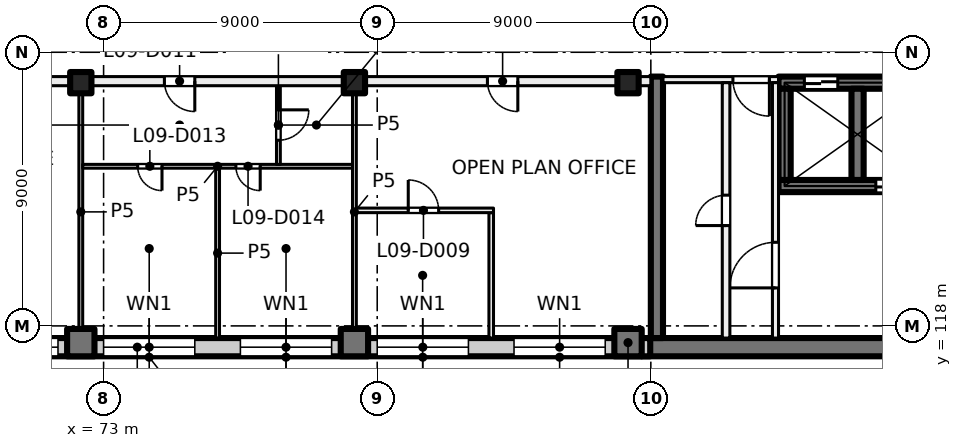
"""IFC4 building model, lengths in metres.
Left out: names, types, materials, properties, quantities, classifications, styles, units other than length and angle.
Written with IfcOpenShell. Run it as: python <this file> out.ifc"""

import sys

from ifc_helpers import new_model, si_unit, direction, frame, frame_2d, origin, origin_2d, place, context, subcontext, project, spatial, rectangle, extrude, element, fill, save


model = new_model("IFC4")
c1 = context("Model", 3, precision=1e-05, world=origin(), true_north=direction((0.0, 1.0)))
c2 = subcontext(c1, "Body", "Model", "MODEL_VIEW")
j1 = project(units=[si_unit("LENGTHUNIT", "METRE"), si_unit("PLANEANGLEUNIT", "RADIAN")], contexts=[c1])
p1 = place(None, origin())
s1 = spatial("IfcSite", under=j1, at=p1, CompositionType="ELEMENT")
p2 = place(p1, origin())
s2 = spatial("IfcBuilding", under=s1, at=p2, CompositionType="ELEMENT")
p3 = place(p2, frame((0.0, 0.0, 43.5)))
s3 = spatial("IfcBuildingStorey", under=s2, at=p3, CompositionType="ELEMENT", Elevation=43.5)
for number, where, z_axis, x_axis in (
    (1, (72.25, 126.0, 0.0), (0.0, 0.0, 1.0), (1.0, 0.0, 0.0)),
    (2, (81.25, 126.0, 0.0), (0.0, 0.0, 1.0), (1.0, 0.0, 0.0)),
    (3, (90.25, 126.0, 0.0), (0.0, 0.0, 1.0), (1.0, 0.0, 0.0)),
):
    element("IfcColumn", number, at=place(p3, frame(where, z_axis=z_axis, x_axis=x_axis)), inside=s3, PredefinedType="COLUMN", context=c2, shape_type="SweptSolid", body=[
        extrude(rectangle(XDim=0.7, YDim=0.7, at=origin_2d()), origin(), (0.0, 0.0, 1.0), 4.0),
    ])
for number, where, z_axis, x_axis in (
    (4, (72.25, 117.45, 0.0), (0.0, 0.0, 1.0), (1.0, 0.0, 0.0)),
    (5, (81.25, 117.45, 0.0), (0.0, 0.0, 1.0), (1.0, 0.0, 0.0)),
    (6, (90.25, 117.45, 0.0), (0.0, 0.0, 1.0), (1.0, 0.0, 0.0)),
):
    element("IfcColumn", number, at=place(p3, frame(where, z_axis=z_axis, x_axis=x_axis)), inside=s3, PredefinedType="COLUMN", context=c2, shape_type="SweptSolid", body=[
        extrude(rectangle(XDim=0.9, YDim=0.9, at=origin_2d()), origin(), (0.0, 0.0, 1.0), 4.0),
    ])
p4 = place(p3, frame((99.6, 117.3, 0.0), z_axis=(0.0, 0.0, 1.0), x_axis=(-1.0, 0.0, 0.0)))
e7 = element("IfcWall", 7, at=p4, inside=s3, PredefinedType="SHEAR", context=c2, shape_type="SweptSolid", body=[
    extrude(rectangle(XDim=8.9, YDim=0.6, at=frame_2d((4.45, 0.0))), origin(), (0.0, 0.0, 1.0), 4.0),
])
p5 = place(p3, frame((107.4, 126.0, 0.0), z_axis=(0.0, 0.0, 1.0), x_axis=(-1.0, 0.0, 0.0)))
e8 = element("IfcWall", 8, at=p5, inside=s3, PredefinedType="SHEAR", context=c2, shape_type="SweptSolid", body=[
    extrude(rectangle(XDim=12.2, YDim=0.4, at=frame_2d((6.1, 0.0))), origin(), (0.0, 0.0, 1.0), 4.0),
])
p6 = place(p5, frame((10.25, 0.0, 0.0)))
e9 = element("IfcOpeningElement", 9, at=p6, cuts=e8, PredefinedType="OPENING", context=c2, shape_type="SweptSolid", body=[
    extrude(rectangle(XDim=1.1, YDim=2.1, at=frame_2d((0.55, 1.05))), frame((0.0, 0.21, 0.0), z_axis=(0.0, -1.0, 0.0), x_axis=(1.0, 0.0, 0.0)), (0.0, 0.0, 1.0), 0.42),
])
p7 = place(p5, frame((0.7, 0.0, 0.0)))
e10 = element("IfcOpeningElement", 10, at=p7, cuts=e8, PredefinedType="OPENING", context=c2, shape_type="SweptSolid", body=[
    extrude(rectangle(XDim=0.8, YDim=2.1, at=frame_2d((0.4, 1.05))), frame((0.0, 0.21, 0.0), z_axis=(0.0, -1.0, 0.0), x_axis=(1.0, 0.0, 0.0)), (0.0, 0.0, 1.0), 0.42),
])
p8 = place(p3, frame((107.4, 122.6, 0.0), z_axis=(0.0, 0.0, 1.0), x_axis=(-1.0, 0.0, 0.0)))
e11 = element("IfcWall", 11, at=p8, inside=s3, PredefinedType="SHEAR", context=c2, shape_type="SweptSolid", body=[
    extrude(rectangle(XDim=12.2, YDim=0.4, at=frame_2d((6.1, 0.0))), origin(), (0.0, 0.0, 1.0), 4.0),
])
p9 = place(p8, frame((7.9, 0.0, 0.0)))
e12 = element("IfcOpeningElement", 12, at=p9, cuts=e11, PredefinedType="OPENING", context=c2, shape_type="SweptSolid", body=[
    extrude(rectangle(XDim=1.1, YDim=2.1, at=frame_2d((0.55, 1.05))), frame((0.0, 0.21, 0.0), z_axis=(0.0, -1.0, 0.0), x_axis=(1.0, 0.0, 0.0)), (0.0, 0.0, 1.0), 0.42),
])
for number, where, z_axis, x_axis in (
    (13, (97.8, 125.8, 0.0), (0.0, 0.0, 1.0), (0.0, -1.0, 0.0)),
    (14, (95.4, 125.8, 0.0), (0.0, 0.0, 1.0), (0.0, -1.0, 0.0)),
):
    element("IfcWall", number, at=place(p3, frame(where, z_axis=z_axis, x_axis=x_axis)), inside=s3, PredefinedType="SHEAR", context=c2, shape_type="SweptSolid", body=[
        extrude(rectangle(XDim=3.0, YDim=0.4, at=frame_2d((1.5, 0.0))), origin(), (0.0, 0.0, 1.0), 4.0),
    ])
p10 = place(p3, frame((91.2, 126.2, 0.0), z_axis=(0.0, 0.0, 1.0), x_axis=(0.0, -1.0, 0.0)))
e15 = element("IfcWall", 15, at=p10, inside=s3, PredefinedType="SHEAR", context=c2, shape_type="SweptSolid", body=[
    extrude(rectangle(XDim=8.6, YDim=0.4, at=frame_2d((4.3, 0.0))), origin(), (0.0, 0.0, 1.0), 4.0),
])
p11 = place(p3, frame((90.98, 117.3, 0.0), z_axis=(0.0, 0.0, 1.0), x_axis=(-1.0, 0.0, 0.0)))
e16 = element("IfcWall", 16, at=p11, inside=s3, PredefinedType="SOLIDWALL", context=c2, shape_type="SweptSolid", body=[
    extrude(rectangle(XDim=33.745, YDim=0.6, at=frame_2d((16.873, 0.0))), origin(), (0.0, 0.0, 1.0), 3.625),
])
p12 = place(p11, frame((1.48, 0.0, 0.9)))
e17 = element("IfcOpeningElement", 17, at=p12, cuts=e16, PredefinedType="OPENING", context=c2, shape_type="SweptSolid", body=[
    extrude(rectangle(XDim=3.0, YDim=2.4, at=frame_2d((1.5, 1.2))), frame((0.0, 0.31, 0.0), z_axis=(0.0, -1.0, 0.0), x_axis=(1.0, 0.0, 0.0)), (0.0, 0.0, 1.0), 0.62),
])
p13 = place(p11, frame((5.98, 0.0, 0.9)))
e18 = element("IfcOpeningElement", 18, at=p13, cuts=e16, PredefinedType="OPENING", context=c2, shape_type="SweptSolid", body=[
    extrude(rectangle(XDim=3.0, YDim=2.4, at=frame_2d((1.5, 1.2))), frame((0.0, 0.31, 0.0), z_axis=(0.0, -1.0, 0.0), x_axis=(1.0, 0.0, 0.0)), (0.0, 0.0, 1.0), 0.62),
])
p14 = place(p11, frame((10.48, 0.0, 0.9)))
e19 = element("IfcOpeningElement", 19, at=p14, cuts=e16, PredefinedType="OPENING", context=c2, shape_type="SweptSolid", body=[
    extrude(rectangle(XDim=3.0, YDim=2.4, at=frame_2d((1.5, 1.2))), frame((0.0, 0.31, 0.0), z_axis=(0.0, -1.0, 0.0), x_axis=(1.0, 0.0, 0.0)), (0.0, 0.0, 1.0), 0.62),
])
p15 = place(p11, frame((14.98, 0.0, 0.9)))
e20 = element("IfcOpeningElement", 20, at=p15, cuts=e16, PredefinedType="OPENING", context=c2, shape_type="SweptSolid", body=[
    extrude(rectangle(XDim=3.0, YDim=2.4, at=frame_2d((1.5, 1.2))), frame((0.0, 0.31, 0.0), z_axis=(0.0, -1.0, 0.0), x_axis=(1.0, 0.0, 0.0)), (0.0, 0.0, 1.0), 0.62),
])
p16 = place(p11, frame((19.48, 0.0, 0.9)))
e21 = element("IfcOpeningElement", 21, at=p16, cuts=e16, PredefinedType="OPENING", context=c2, shape_type="SweptSolid", body=[
    extrude(rectangle(XDim=3.0, YDim=2.4, at=frame_2d((1.5, 1.2))), frame((0.0, 0.31, 0.0), z_axis=(0.0, -1.0, 0.0), x_axis=(1.0, 0.0, 0.0)), (0.0, 0.0, 1.0), 0.62),
])
p17 = place(p11, frame((24.58, 0.0, 0.0)))
e22 = element("IfcOpeningElement", 22, at=p17, cuts=e16, PredefinedType="OPENING", context=c2, shape_type="SweptSolid", body=[
    extrude(rectangle(XDim=1.8, YDim=2.4, at=frame_2d((0.9, 1.2))), frame((0.0, 0.31, 0.0), z_axis=(0.0, -1.0, 0.0), x_axis=(1.0, 0.0, 0.0)), (0.0, 0.0, 1.0), 0.62),
])
p18 = place(p11, frame((28.48, 0.0, 0.9)))
e23 = element("IfcOpeningElement", 23, at=p18, cuts=e16, PredefinedType="OPENING", context=c2, shape_type="SweptSolid", body=[
    extrude(rectangle(XDim=3.0, YDim=2.4, at=frame_2d((1.5, 1.2))), frame((0.0, 0.31, 0.0), z_axis=(0.0, -1.0, 0.0), x_axis=(1.0, 0.0, 0.0)), (0.0, 0.0, 1.0), 0.62),
])
p19 = place(p3, frame((95.2, 126.1, 0.0), z_axis=(0.0, 0.0, 1.0), x_axis=(-1.0, 0.0, 0.0)))
e24 = element("IfcWall", 24, at=p19, inside=s3, PredefinedType="PARTITIONING", context=c2, shape_type="SweptSolid", body=[
    extrude(rectangle(XDim=3.8, YDim=0.2, at=frame_2d((1.9, 0.0))), origin(), (0.0, 0.0, 1.0), 3.625),
])
p20 = place(p19, frame((0.3, 0.0, 0.0)))
e25 = element("IfcOpeningElement", 25, at=p20, cuts=e24, PredefinedType="OPENING", context=c2, shape_type="SweptSolid", body=[
    extrude(rectangle(XDim=1.2, YDim=2.1, at=frame_2d((0.6, 1.05))), frame((0.0, 0.11, 0.0), z_axis=(0.0, -1.0, 0.0), x_axis=(1.0, 0.0, 0.0)), (0.0, 0.0, 1.0), 0.22),
])
p21 = place(p3, frame((95.1, 117.6, 0.0), z_axis=(0.0, 0.0, 1.0), x_axis=(0.0, 1.0, 0.0)))
e26 = element("IfcWall", 26, at=p21, inside=s3, PredefinedType="PARTITIONING", context=c2, shape_type="SweptSolid", body=[
    extrude(rectangle(XDim=8.4, YDim=0.2, at=frame_2d((4.2, 0.0))), origin(), (0.0, 0.0, 1.0), 3.625),
])
p22 = place(p21, frame((1.65, 0.0, 0.0)))
e27 = element("IfcOpeningElement", 27, at=p22, cuts=e26, PredefinedType="OPENING", context=c2, shape_type="SweptSolid", body=[
    extrude(rectangle(XDim=1.5, YDim=2.1, at=frame_2d((0.75, 1.05))), frame((0.0, 0.11, 0.0), z_axis=(0.0, -1.0, 0.0), x_axis=(1.0, 0.0, 0.0)), (0.0, 0.0, 1.0), 0.22),
])
p23 = place(p3, frame((93.475, 117.6, 0.0), z_axis=(0.0, 0.0, 1.0), x_axis=(0.0, 1.0, 0.0)))
e28 = element("IfcWall", 28, at=p23, inside=s3, PredefinedType="PARTITIONING", context=c2, shape_type="SweptSolid", body=[
    extrude(rectangle(XDim=8.4, YDim=0.25, at=frame_2d((4.2, 0.0))), origin(), (0.0, 0.0, 1.0), 3.625),
])
p24 = place(p23, frame((3.7, 0.0, 0.0)))
e29 = element("IfcOpeningElement", 29, at=p24, cuts=e28, PredefinedType="OPENING", context=c2, shape_type="SweptSolid", body=[
    extrude(rectangle(XDim=1.0, YDim=2.1, at=frame_2d((0.5, 1.05))), frame((0.0, 0.135, 0.0), z_axis=(0.0, -1.0, 0.0), x_axis=(1.0, 0.0, 0.0)), (0.0, 0.0, 1.0), 0.27),
])
p25 = place(p3, frame((72.25, 117.6, 0.0), z_axis=(0.0, 0.0, 1.0), x_axis=(0.0, 1.0, 0.0)))
e30 = element("IfcWall", 30, at=p25, inside=s3, PredefinedType="PARTITIONING", context=c2, shape_type="SweptSolid", body=[
    extrude(rectangle(XDim=8.3, YDim=0.125, at=frame_2d((4.15, 0.0))), origin(), (0.0, 0.0, 1.0), 3.625),
])
p26 = place(p3, frame((81.188, 123.25, 0.0), z_axis=(0.0, 0.0, 1.0), x_axis=(-1.0, 0.0, 0.0)))
e31 = element("IfcWall", 31, at=p26, inside=s3, PredefinedType="PARTITIONING", context=c2, shape_type="SweptSolid", body=[
    extrude(rectangle(XDim=8.876, YDim=0.125, at=frame_2d((4.438, 0.0))), origin(), (0.0, 0.0, 1.0), 3.625),
])
p27 = place(p26, frame((6.267, 0.0, 0.0)))
e32 = element("IfcOpeningElement", 32, at=p27, cuts=e31, PredefinedType="OPENING", context=c2, shape_type="SweptSolid", body=[
    extrude(rectangle(XDim=0.8, YDim=2.1, at=frame_2d((0.4, 1.05))), frame((0.0, 0.073, 0.0), z_axis=(0.0, -1.0, 0.0), x_axis=(1.0, 0.0, 0.0)), (0.0, 0.0, 1.0), 0.145),
])
p28 = place(p26, frame((3.037, 0.0, 0.0)))
e33 = element("IfcOpeningElement", 33, at=p28, cuts=e31, PredefinedType="OPENING", context=c2, shape_type="SweptSolid", body=[
    extrude(rectangle(XDim=0.8, YDim=2.1, at=frame_2d((0.4, 1.05))), frame((0.0, 0.073, 0.0), z_axis=(0.0, -1.0, 0.0), x_axis=(1.0, 0.0, 0.0)), (0.0, 0.0, 1.0), 0.145),
])
p29 = place(p3, frame((76.75, 117.6, 0.0), z_axis=(0.0, 0.0, 1.0), x_axis=(0.0, 1.0, 0.0)))
e34 = element("IfcWall", 34, at=p29, inside=s3, PredefinedType="PARTITIONING", context=c2, shape_type="SweptSolid", body=[
    extrude(rectangle(XDim=5.588, YDim=0.125, at=frame_2d((2.794, 0.0))), origin(), (0.0, 0.0, 1.0), 3.625),
])
p30 = place(p3, frame((78.75, 125.9, 0.0), z_axis=(0.0, 0.0, 1.0), x_axis=(0.0, -1.0, 0.0)))
e35 = element("IfcWall", 35, at=p30, inside=s3, PredefinedType="PARTITIONING", context=c2, shape_type="SweptSolid", body=[
    extrude(rectangle(XDim=2.588, YDim=0.125, at=frame_2d((1.294, 0.0))), origin(), (0.0, 0.0, 1.0), 3.625),
])
p31 = place(p30, frame((0.794, 0.0, 0.0)))
e36 = element("IfcOpeningElement", 36, at=p31, cuts=e35, PredefinedType="OPENING", context=c2, shape_type="SweptSolid", body=[
    extrude(rectangle(XDim=1.0, YDim=2.1, at=frame_2d((0.5, 1.05))), frame((0.0, 0.073, 0.0), z_axis=(0.0, -1.0, 0.0), x_axis=(1.0, 0.0, 0.0)), (0.0, 0.0, 1.0), 0.145),
])
p32 = place(p3, frame((81.25, 117.6, 0.0), z_axis=(0.0, 0.0, 1.0), x_axis=(0.0, 1.0, 0.0)))
e37 = element("IfcWall", 37, at=p32, inside=s3, PredefinedType="PARTITIONING", context=c2, shape_type="SweptSolid", body=[
    extrude(rectangle(XDim=8.3, YDim=0.125, at=frame_2d((4.15, 0.0))), origin(), (0.0, 0.0, 1.0), 3.625),
])
p33 = place(p3, frame((85.75, 117.6, 0.0), z_axis=(0.0, 0.0, 1.0), x_axis=(0.0, 1.0, 0.0)))
e38 = element("IfcWall", 38, at=p33, inside=s3, PredefinedType="PARTITIONING", context=c2, shape_type="SweptSolid", body=[
    extrude(rectangle(XDim=4.125, YDim=0.15, at=frame_2d((2.062, 0.0))), origin(), (0.0, 0.0, 1.0), 3.625),
])
p34 = place(p3, frame((81.312, 121.8, 0.0), z_axis=(0.0, 0.0, 1.0), x_axis=(1.0, 0.0, 0.0)))
e39 = element("IfcWall", 39, at=p34, inside=s3, PredefinedType="PARTITIONING", context=c2, shape_type="SweptSolid", body=[
    extrude(rectangle(XDim=4.513, YDim=0.15, at=frame_2d((2.256, 0.0))), origin(), (0.0, 0.0, 1.0), 3.625),
])
p35 = place(p34, frame((1.709, 0.0, 0.0)))
e40 = element("IfcOpeningElement", 40, at=p35, cuts=e39, PredefinedType="OPENING", context=c2, shape_type="SweptSolid", body=[
    extrude(rectangle(XDim=1.0, YDim=2.1, at=frame_2d((0.5, 1.05))), frame((0.0, 0.085, 0.0), z_axis=(0.0, -1.0, 0.0), x_axis=(1.0, 0.0, 0.0)), (0.0, 0.0, 1.0), 0.17),
])
p36 = place(p3, frame((91.0, 126.05, 0.0), z_axis=(0.0, 0.0, 1.0), x_axis=(-1.0, 0.0, 0.0)))
e41 = element("IfcWall", 41, at=p36, inside=s3, PredefinedType="PARTITIONING", context=c2, shape_type="SweptSolid", body=[
    extrude(rectangle(XDim=43.785, YDim=0.3, at=frame_2d((21.893, 0.0))), origin(), (0.0, 0.0, 1.0), 3.625),
])
p37 = place(p36, frame((4.375, 0.0, 0.0)))
e42 = element("IfcOpeningElement", 42, at=p37, cuts=e41, PredefinedType="OPENING", context=c2, shape_type="SweptSolid", body=[
    extrude(rectangle(XDim=1.0, YDim=2.1, at=frame_2d((0.5, 1.05))), frame((0.0, 0.16, 0.0), z_axis=(0.0, -1.0, 0.0), x_axis=(1.0, 0.0, 0.0)), (0.0, 0.0, 1.0), 0.32),
])
p38 = place(p36, frame((15.0, 0.0, 0.0)))
e43 = element("IfcOpeningElement", 43, at=p38, cuts=e41, PredefinedType="OPENING", context=c2, shape_type="SweptSolid", body=[
    extrude(rectangle(XDim=1.0, YDim=2.1, at=frame_2d((0.5, 1.05))), frame((0.0, 0.16, 0.0), z_axis=(0.0, -1.0, 0.0), x_axis=(1.0, 0.0, 0.0)), (0.0, 0.0, 1.0), 0.32),
])
p39 = place(p36, frame((34.0, 0.0, 0.0)))
e44 = element("IfcOpeningElement", 44, at=p39, cuts=e41, PredefinedType="OPENING", context=c2, shape_type="SweptSolid", body=[
    extrude(rectangle(XDim=1.0, YDim=2.1, at=frame_2d((0.5, 1.05))), frame((0.0, 0.16, 0.0), z_axis=(0.0, -1.0, 0.0), x_axis=(1.0, 0.0, 0.0)), (0.0, 0.0, 1.0), 0.32),
])
p40 = place(p36, frame((39.296, 0.0, 0.0)))
e45 = element("IfcOpeningElement", 45, at=p40, cuts=e41, PredefinedType="OPENING", context=c2, shape_type="SweptSolid", body=[
    extrude(rectangle(XDim=1.8, YDim=2.1, at=frame_2d((0.9, 1.05))), frame((0.0, 0.16, 0.0), z_axis=(0.0, -1.0, 0.0), x_axis=(1.0, 0.0, 0.0)), (0.0, 0.0, 1.0), 0.32),
])
p41 = place(p12, origin())
e46 = element("IfcWindow", 46, at=p41, inside=s3, PartitioningType="SINGLE_PANEL", PredefinedType="WINDOW", context=c2, shape_type="SweptSolid", body=[
    extrude(rectangle(XDim=3.0, YDim=2.4, at=frame_2d((1.5, 1.2))), frame((0.0, 0.03, 0.0), z_axis=(0.0, -1.0, 0.0), x_axis=(1.0, 0.0, 0.0)), (0.0, 0.0, 1.0), 0.06),
])
fill(e17, e46)
p42 = place(p13, origin())
e47 = element("IfcWindow", 47, at=p42, inside=s3, PartitioningType="SINGLE_PANEL", PredefinedType="WINDOW", context=c2, shape_type="SweptSolid", body=[
    extrude(rectangle(XDim=3.0, YDim=2.4, at=frame_2d((1.5, 1.2))), frame((0.0, 0.03, 0.0), z_axis=(0.0, -1.0, 0.0), x_axis=(1.0, 0.0, 0.0)), (0.0, 0.0, 1.0), 0.06),
])
fill(e18, e47)
p43 = place(p14, origin())
e48 = element("IfcWindow", 48, at=p43, inside=s3, PartitioningType="SINGLE_PANEL", PredefinedType="WINDOW", context=c2, shape_type="SweptSolid", body=[
    extrude(rectangle(XDim=3.0, YDim=2.4, at=frame_2d((1.5, 1.2))), frame((0.0, 0.03, 0.0), z_axis=(0.0, -1.0, 0.0), x_axis=(1.0, 0.0, 0.0)), (0.0, 0.0, 1.0), 0.06),
])
fill(e19, e48)
p44 = place(p15, origin())
e49 = element("IfcWindow", 49, at=p44, inside=s3, PartitioningType="SINGLE_PANEL", PredefinedType="WINDOW", context=c2, shape_type="SweptSolid", body=[
    extrude(rectangle(XDim=3.0, YDim=2.4, at=frame_2d((1.5, 1.2))), frame((0.0, 0.03, 0.0), z_axis=(0.0, -1.0, 0.0), x_axis=(1.0, 0.0, 0.0)), (0.0, 0.0, 1.0), 0.06),
])
fill(e20, e49)
p45 = place(p16, origin())
e50 = element("IfcWindow", 50, at=p45, inside=s3, PartitioningType="SINGLE_PANEL", PredefinedType="WINDOW", context=c2, shape_type="SweptSolid", body=[
    extrude(rectangle(XDim=3.0, YDim=2.4, at=frame_2d((1.5, 1.2))), frame((0.0, 0.03, 0.0), z_axis=(0.0, -1.0, 0.0), x_axis=(1.0, 0.0, 0.0)), (0.0, 0.0, 1.0), 0.06),
])
fill(e21, e50)
p46 = place(p6, origin())
e51 = element("IfcDoor", 51, at=p46, inside=s3, OperationType="DOUBLE_DOOR_SLIDING", PredefinedType="DOOR", context=c2, shape_type="SweptSolid", body=[
    extrude(rectangle(XDim=1.1, YDim=2.1, at=frame_2d((0.55, 1.05))), frame((0.0, 0.025, 0.0), z_axis=(0.0, -1.0, 0.0), x_axis=(1.0, 0.0, 0.0)), (0.0, 0.0, 1.0), 0.05),
])
fill(e9, e51)
p47 = place(p20, origin())
e52 = element("IfcDoor", 52, at=p47, inside=s3, OperationType="DOUBLE_DOOR_SINGLE_SWING", PredefinedType="DOOR", context=c2, shape_type="SweptSolid", body=[
    extrude(rectangle(XDim=1.2, YDim=2.1, at=frame_2d((0.6, 1.05))), frame((0.0, 0.025, 0.0), z_axis=(0.0, -1.0, 0.0), x_axis=(1.0, 0.0, 0.0)), (0.0, 0.0, 1.0), 0.05),
])
fill(e25, e52)
p48 = place(p22, origin())
e53 = element("IfcDoor", 53, at=p48, inside=s3, OperationType="DOUBLE_DOOR_SINGLE_SWING", PredefinedType="DOOR", context=c2, shape_type="SweptSolid", body=[
    extrude(rectangle(XDim=1.5, YDim=2.1, at=frame_2d((0.75, 1.05))), frame((0.0, 0.025, 0.0), z_axis=(0.0, -1.0, 0.0), x_axis=(1.0, 0.0, 0.0)), (0.0, 0.0, 1.0), 0.05),
])
fill(e27, e53)
p49 = place(p24, origin())
e54 = element("IfcDoor", 54, at=p49, inside=s3, OperationType="SINGLE_SWING_LEFT", PredefinedType="DOOR", context=c2, shape_type="SweptSolid", body=[
    extrude(rectangle(XDim=1.0, YDim=2.1, at=frame_2d((0.5, 1.05))), frame((0.0, 0.025, 0.0), z_axis=(0.0, -1.0, 0.0), x_axis=(1.0, 0.0, 0.0)), (0.0, 0.0, 1.0), 0.05),
])
fill(e29, e54)
p50 = place(p9, origin())
e55 = element("IfcDoor", 55, at=p50, inside=s3, OperationType="DOUBLE_DOOR_SLIDING", PredefinedType="DOOR", context=c2, shape_type="SweptSolid", body=[
    extrude(rectangle(XDim=1.1, YDim=2.1, at=frame_2d((0.55, 1.05))), frame((0.0, 0.025, 0.0), z_axis=(0.0, -1.0, 0.0), x_axis=(1.0, 0.0, 0.0)), (0.0, 0.0, 1.0), 0.05),
])
fill(e12, e55)
p51 = place(p35, origin())
e56 = element("IfcDoor", 56, at=p51, inside=s3, OperationType="SINGLE_SWING_LEFT", PredefinedType="DOOR", context=c2, shape_type="SweptSolid", body=[
    extrude(rectangle(XDim=1.0, YDim=2.1, at=frame_2d((0.5, 1.05))), frame((0.0, 0.025, 0.0), z_axis=(0.0, -1.0, 0.0), x_axis=(1.0, 0.0, 0.0)), (0.0, 0.0, 1.0), 0.05),
])
fill(e40, e56)
p52 = place(p37, origin())
e57 = element("IfcDoor", 57, at=p52, inside=s3, OperationType="SINGLE_SWING_LEFT", PredefinedType="DOOR", context=c2, shape_type="SweptSolid", body=[
    extrude(rectangle(XDim=1.0, YDim=2.1, at=frame_2d((0.5, 1.05))), frame((0.0, 0.025, 0.0), z_axis=(0.0, -1.0, 0.0), x_axis=(1.0, 0.0, 0.0)), (0.0, 0.0, 1.0), 0.05),
])
fill(e42, e57)
p53 = place(p38, origin())
e58 = element("IfcDoor", 58, at=p53, inside=s3, OperationType="SINGLE_SWING_LEFT", PredefinedType="DOOR", context=c2, shape_type="SweptSolid", body=[
    extrude(rectangle(XDim=1.0, YDim=2.1, at=frame_2d((0.5, 1.05))), frame((0.0, 0.025, 0.0), z_axis=(0.0, -1.0, 0.0), x_axis=(1.0, 0.0, 0.0)), (0.0, 0.0, 1.0), 0.05),
])
fill(e43, e58)
p54 = place(p31, origin())
e59 = element("IfcDoor", 59, at=p54, inside=s3, OperationType="SINGLE_SWING_RIGHT", PredefinedType="DOOR", context=c2, shape_type="SweptSolid", body=[
    extrude(rectangle(XDim=1.0, YDim=2.1, at=frame_2d((0.5, 1.05))), frame((0.0, 0.025, 0.0), z_axis=(0.0, -1.0, 0.0), x_axis=(1.0, 0.0, 0.0)), (0.0, 0.0, 1.0), 0.05),
])
fill(e36, e59)
p55 = place(p27, origin())
e60 = element("IfcDoor", 60, at=p55, inside=s3, OperationType="SINGLE_SWING_RIGHT", PredefinedType="DOOR", context=c2, shape_type="SweptSolid", body=[
    extrude(rectangle(XDim=0.8, YDim=2.1, at=frame_2d((0.4, 1.05))), frame((0.0, 0.025, 0.0), z_axis=(0.0, -1.0, 0.0), x_axis=(1.0, 0.0, 0.0)), (0.0, 0.0, 1.0), 0.05),
])
fill(e32, e60)
p56 = place(p28, origin())
e61 = element("IfcDoor", 61, at=p56, inside=s3, OperationType="SINGLE_SWING_LEFT", PredefinedType="DOOR", context=c2, shape_type="SweptSolid", body=[
    extrude(rectangle(XDim=0.8, YDim=2.1, at=frame_2d((0.4, 1.05))), frame((0.0, 0.025, 0.0), z_axis=(0.0, -1.0, 0.0), x_axis=(1.0, 0.0, 0.0)), (0.0, 0.0, 1.0), 0.05),
])
fill(e33, e61)
save(model, sys.argv[1])
